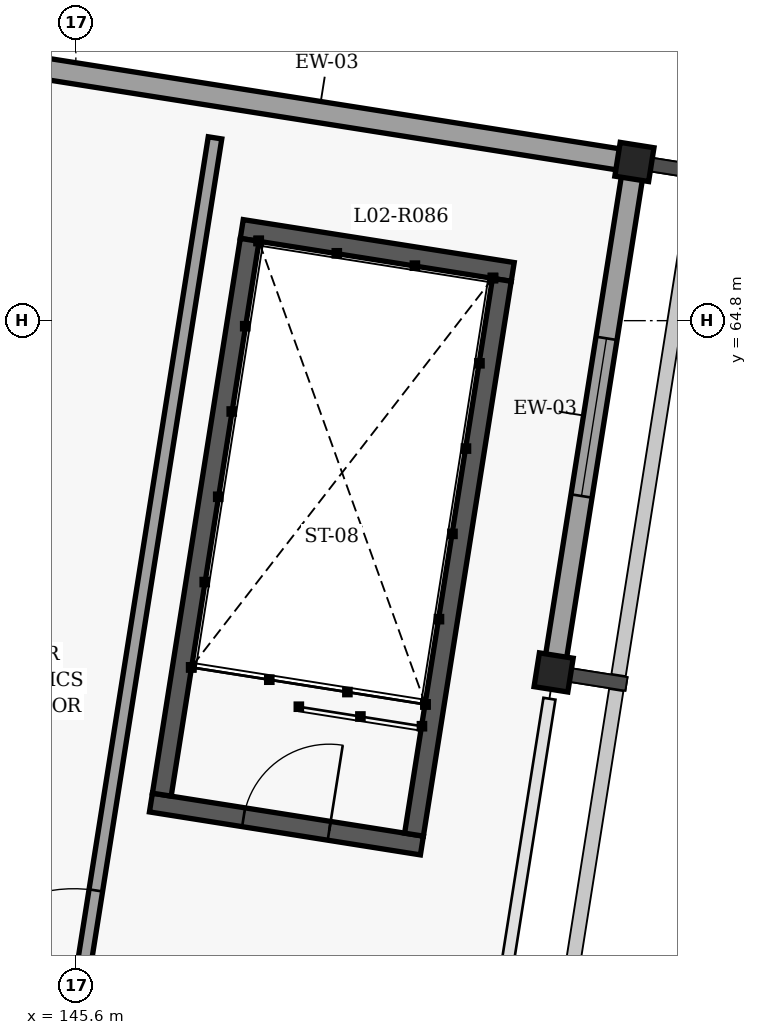
"""IFC4 building model, lengths in metres.
Left out: names, types, materials, properties, quantities, classifications, styles, units other than length and angle.
Written with IfcOpenShell. Run it as: python <this file> out.ifc"""

import sys

from ifc_helpers import new_model, si_unit, direction, frame, frame_2d, origin, origin_2d, place, context, subcontext, project, spatial, rectangle, extrude, element, fill, save


model = new_model("IFC4")
c1 = context("Model", 3, precision=1e-05, world=origin(), true_north=direction((0.0, 1.0)))
c2 = subcontext(c1, "Body", "Model", "MODEL_VIEW")
j1 = project(units=[si_unit("LENGTHUNIT", "METRE"), si_unit("PLANEANGLEUNIT", "RADIAN")], contexts=[c1])
p1 = place(None, origin())
s1 = spatial("IfcSite", under=j1, at=p1, CompositionType="ELEMENT")
p2 = place(p1, origin())
s2 = spatial("IfcBuilding", under=s1, at=p2, CompositionType="ELEMENT")
p3 = place(p2, frame((0.0, 0.0, 9.0)))
s3 = spatial("IfcBuildingStorey", under=s2, at=p3, CompositionType="ELEMENT", Elevation=9.0)
for number, where, z_axis, x_axis in (
    (1, (151.886, 60.172, 0.0), (0.0, 0.0, 1.0), (0.988, -0.156, 0.0)),
    (2, (152.949, 66.888, 0.0), (0.0, 0.0, 1.0), (0.988, -0.156, 0.0)),
):
    element("IfcColumn", number, at=place(p3, frame(where, z_axis=z_axis, x_axis=x_axis)), inside=s3, PredefinedType="COLUMN", context=c2, shape_type="SweptSolid", body=[
        extrude(rectangle(XDim=0.45, YDim=0.45, at=origin_2d()), origin(), (0.0, 0.0, 1.0), 3.9),
    ])
p4 = place(p3, frame((151.901, 60.271, 0.0), z_axis=(0.0, 0.0, 1.0), x_axis=(0.156536171909, 0.987672226442, 0.0)))
e3 = element("IfcWall", 3, at=p4, inside=s3, PredefinedType="SOLIDWALL", context=c2, shape_type="SweptSolid", body=[
    extrude(rectangle(XDim=6.6, YDim=0.28, at=frame_2d((3.3, 0.0))), origin(), (0.0, 0.0, 1.0), 3.45),
])
p5 = place(p4, frame((2.25, 0.0, 1.35)))
e4 = element("IfcOpeningElement", 4, at=p5, cuts=e3, PredefinedType="OPENING", context=c2, shape_type="SweptSolid", body=[
    extrude(rectangle(XDim=2.1, YDim=1.8, at=frame_2d((1.05, 0.9))), frame((0.0, 0.15, 0.0), z_axis=(0.0, -1.0, 0.0), x_axis=(1.0, 0.0, 0.0)), (0.0, 0.0, 1.0), 0.3),
])
p6 = place(p3, frame((144.732, 68.189, 0.0), z_axis=(0.0, 0.0, 1.0), x_axis=(0.987704756752, -0.156330782283, 0.0)))
e5 = element("IfcWall", 5, at=p6, inside=s3, PredefinedType="SOLIDWALL", context=c2, shape_type="SweptSolid", body=[
    extrude(rectangle(XDim=8.24, YDim=0.28, at=frame_2d((4.12, 0.0))), origin(), (0.0, 0.0, 1.0), 3.45),
])
p7 = place(p3, frame((144.666, 68.281, 0.0), z_axis=(0.0, 0.0, 1.0), x_axis=(0.15632126228, 0.987706263501, 0.0)))
e6 = element("IfcWall", 6, at=p7, inside=s3, PredefinedType="SOLIDWALL", context=c2, shape_type="SweptSolid", body=[
    extrude(rectangle(XDim=6.641, YDim=0.28, at=frame_2d((3.32, 0.0))), origin(), (0.0, 0.0, 1.0), 3.45),
])
p8 = place(p3, frame((150.153, 57.895, 0.0), z_axis=(0.0, 0.0, 1.0), x_axis=(-0.987676717047, 0.156507835599, 0.0)))
e7 = element("IfcWall", 7, at=p8, inside=s3, PredefinedType="SHEAR", context=c2, shape_type="SweptSolid", body=[
    extrude(rectangle(XDim=3.61, YDim=0.25, at=frame_2d((1.805, 0.0))), origin(), (0.0, 0.0, 1.0), 3.66),
])
p9 = place(p8, frame((1.235, 0.0, 0.0)))
e8 = element("IfcOpeningElement", 8, at=p9, cuts=e7, PredefinedType="OPENING", context=c2, shape_type="SweptSolid", body=[
    extrude(rectangle(XDim=1.14, YDim=2.15, at=frame_2d((0.57, 1.075))), frame((0.0, 0.135, 0.0), z_axis=(0.0, -1.0, 0.0), x_axis=(1.0, 0.0, 0.0)), (0.0, 0.0, 1.0), 0.27),
])
p10 = place(p3, frame((147.783, 66.006, 0.0), z_axis=(0.0, 0.0, 1.0), x_axis=(0.987664601714, -0.156584272906, 0.0)))
e9 = element("IfcWall", 9, at=p10, inside=s3, PredefinedType="SHEAR", context=c2, shape_type="SweptSolid", body=[
    extrude(rectangle(XDim=3.609, YDim=0.25, at=frame_2d((1.805, 0.0))), origin(), (0.0, 0.0, 1.0), 3.66),
])
p11 = place(p3, frame((146.731, 58.564, 0.0), z_axis=(0.0, 0.0, 1.0), x_axis=(0.15642738738, 0.98768946156, 0.0)))
e10 = element("IfcWall", 10, at=p11, inside=s3, PredefinedType="SHEAR", context=c2, shape_type="SweptSolid", body=[
    extrude(rectangle(XDim=7.39, YDim=0.25, at=frame_2d((3.695, 0.0))), origin(), (0.0, 0.0, 1.0), 3.66),
])
p12 = place(p3, frame((151.205, 65.337, 0.0), z_axis=(0.0, 0.0, 1.0), x_axis=(-0.156432491725, -0.987688653136, 0.0)))
e11 = element("IfcWall", 11, at=p12, inside=s3, PredefinedType="SHEAR", context=c2, shape_type="SweptSolid", body=[
    extrude(rectangle(XDim=7.39, YDim=0.25, at=frame_2d((3.695, 0.0))), origin(), (0.0, 0.0, 1.0), 3.66),
])
p13 = place(p3, frame((143.348, 41.427, 0.0), z_axis=(0.0, 0.0, 1.0), x_axis=(0.156440506918, 0.987687383637, 0.0)))
e12 = element("IfcWall", 12, at=p13, inside=s3, PredefinedType="PARTITIONING", context=c2, shape_type="SweptSolid", body=[
    extrude(rectangle(XDim=26.099, YDim=0.18, at=frame_2d((13.05, 0.0))), origin(), (0.0, 0.0, 1.0), 3.645),
])
p14 = place(p13, frame((7.7, 0.0, 0.0)))
e13 = element("IfcOpeningElement", 13, at=p14, cuts=e12, PredefinedType="OPENING", context=c2, shape_type="SweptSolid", body=[
    extrude(rectangle(XDim=2.0, YDim=2.3, at=frame_2d((1.0, 1.15))), frame((0.0, 0.1, 0.0), z_axis=(0.0, -1.0, 0.0), x_axis=(1.0, 0.0, 0.0)), (0.0, 0.0, 1.0), 0.2),
])
p15 = place(p13, frame((14.225, 0.0, 0.0)))
e14 = element("IfcOpeningElement", 14, at=p15, cuts=e12, PredefinedType="OPENING", context=c2, shape_type="SweptSolid", body=[
    extrude(rectangle(XDim=1.85, YDim=2.22, at=frame_2d((0.925, 1.11))), frame((0.0, 0.1, 0.0), z_axis=(0.0, -1.0, 0.0), x_axis=(1.0, 0.0, 0.0)), (0.0, 0.0, 1.0), 0.2),
])
p16 = place(p5, origin())
e15 = element("IfcWindow", 15, at=p16, inside=s3, PartitioningType="SINGLE_PANEL", PredefinedType="WINDOW", context=c2, shape_type="SweptSolid", body=[
    extrude(rectangle(XDim=2.1, YDim=1.8, at=frame_2d((1.05, 0.9))), frame((0.0, 0.03, 0.0), z_axis=(0.0, -1.0, 0.0), x_axis=(1.0, 0.0, 0.0)), (0.0, 0.0, 1.0), 0.06),
])
fill(e4, e15)
p17 = place(p9, origin())
e16 = element("IfcDoor", 16, at=p17, inside=s3, OperationType="SINGLE_SWING_RIGHT", PredefinedType="DOOR", context=c2, shape_type="SweptSolid", body=[
    extrude(rectangle(XDim=1.14, YDim=2.15, at=frame_2d((0.57, 1.075))), frame((0.0, 0.025, 0.0), z_axis=(0.0, -1.0, 0.0), x_axis=(1.0, 0.0, 0.0)), (0.0, 0.0, 1.0), 0.05),
])
fill(e8, e16)
p18 = place(p15, origin())
e17 = element("IfcDoor", 17, at=p18, inside=s3, OperationType="DOUBLE_DOOR_SINGLE_SWING", PredefinedType="DOOR", context=c2, shape_type="SweptSolid", body=[
    extrude(rectangle(XDim=1.85, YDim=2.22, at=frame_2d((0.925, 1.11))), frame((0.0, 0.025, 0.0), z_axis=(0.0, -1.0, 0.0), x_axis=(1.0, 0.0, 0.0)), (0.0, 0.0, 1.0), 0.05),
])
fill(e14, e17)
save(model, sys.argv[1])
